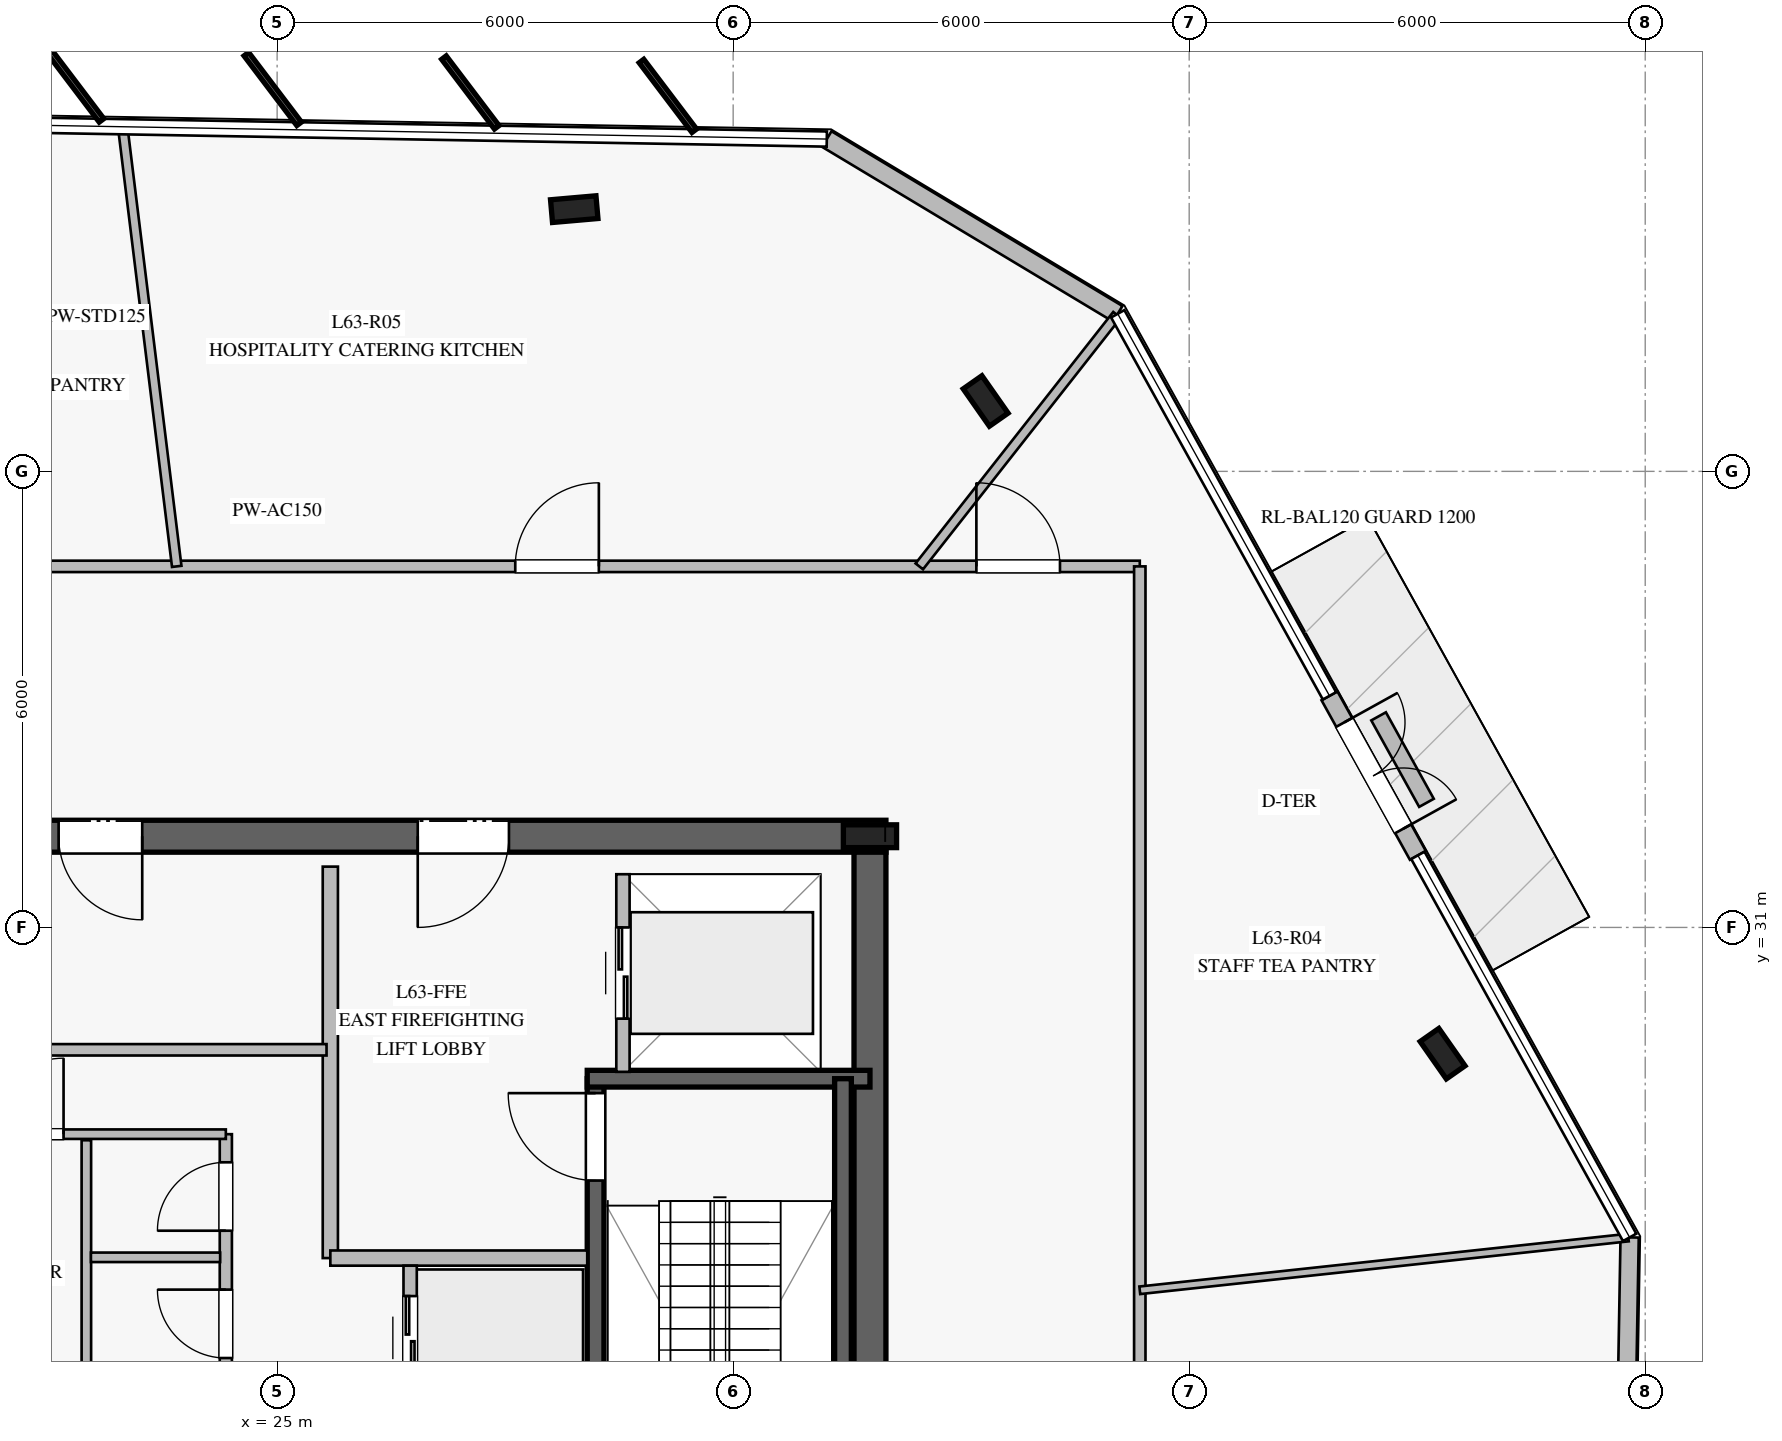
"""IFC4 building model, lengths in metres.
Left out: names, types, materials, properties, quantities, classifications, styles, units other than length and angle.
Written with IfcOpenShell. Run it as: python <this file> out.ifc"""

import sys

from ifc_helpers import new_model, si_unit, direction, frame, frame_2d, origin, origin_2d, place, context, subcontext, project, spatial, rectangle, i_section, extrude, element, fill, save


model = new_model("IFC4")
c1 = context("Model", 3, precision=1e-05, world=origin(), true_north=direction((0.0, 1.0)))
c2 = subcontext(c1, "Body", "Model", "MODEL_VIEW")
j1 = project(units=[si_unit("LENGTHUNIT", "METRE"), si_unit("PLANEANGLEUNIT", "RADIAN")], contexts=[c1])
p1 = place(None, origin())
s1 = spatial("IfcSite", under=j1, at=p1, CompositionType="ELEMENT")
p2 = place(p1, origin())
s2 = spatial("IfcBuilding", under=s1, at=p2, CompositionType="ELEMENT")
p3 = place(p2, frame((0.0, 0.0, 262.2)))
s3 = spatial("IfcBuildingStorey", under=s2, at=p3, CompositionType="ELEMENT", Elevation=262.2)
p4 = place(p3, frame((33.01, 32.2, 0.0), z_axis=(0.0, 0.0, 1.0), x_axis=(-1.0, 0.0, 0.0)))
e1 = element("IfcWall", 1, at=p4, inside=s3, PredefinedType="SHEAR", context=c2, shape_type="SweptSolid", body=[
    extrude(rectangle(XDim=16.02, YDim=0.42, at=frame_2d((8.01, 0.0))), origin(), (0.0, 0.0, 1.0), 3.78),
])
p5 = place(p4, frame((4.96, 0.0, 0.0)))
e2 = element("IfcOpeningElement", 2, at=p5, cuts=e1, PredefinedType="OPENING", context=c2, shape_type="SweptSolid", body=[
    extrude(rectangle(XDim=1.2, YDim=2.25, at=frame_2d((0.6, 1.125))), frame((0.0, 0.22, 0.0), z_axis=(0.0, -1.0, 0.0), x_axis=(1.0, 0.0, 0.0)), (0.0, 0.0, 1.0), 0.44),
])
p6 = place(p4, frame((9.785, 0.0, 0.0)))
e3 = element("IfcOpeningElement", 3, at=p6, cuts=e1, PredefinedType="OPENING", context=c2, shape_type="SweptSolid", body=[
    extrude(rectangle(XDim=1.1, YDim=2.2, at=frame_2d((0.55, 1.1))), frame((0.0, 0.22, 0.0), z_axis=(0.0, -1.0, 0.0), x_axis=(1.0, 0.0, 0.0)), (0.0, 0.0, 1.0), 0.44),
])
p7 = place(p3, frame((32.8, 18.01, 0.0), z_axis=(0.0, 0.0, 1.0), x_axis=(0.0, 1.0, 0.0)))
e4 = element("IfcWall", 4, at=p7, inside=s3, PredefinedType="SHEAR", context=c2, shape_type="SweptSolid", body=[
    extrude(rectangle(XDim=13.98, YDim=0.42, at=frame_2d((6.99, 0.0))), origin(), (0.0, 0.0, 1.0), 3.78),
])
p8 = place(p3, frame((32.8, 32.2, 0.0), z_axis=(0.0, 0.0, 1.0), x_axis=(1.0, 0.0, 0.0)))
e5 = element("IfcColumn", 5, at=p8, inside=s3, PredefinedType="COLUMN", context=c2, shape_type="SweptSolid", body=[
    extrude(i_section(OverallWidth=0.3, OverallDepth=0.7, WebThickness=0.017, FlangeThickness=0.032, at=origin_2d()), origin(), (0.0, 0.0, 1.0), 4.0),
])
p9 = place(p3, frame((29.19, 21.79, 0.0), z_axis=(0.0, 0.0, 1.0), x_axis=(0.0, 1.0, 0.0)))
e6 = element("IfcWall", 6, at=p9, inside=s3, PredefinedType="SOLIDWALL", context=c2, shape_type="SweptSolid", body=[
    extrude(rectangle(XDim=7.22, YDim=0.22, at=frame_2d((3.61, 0.0))), origin(), (0.0, 0.0, 1.0), 3.78),
])
p10 = place(p9, frame((5.88, 0.0, 0.0)))
e7 = element("IfcOpeningElement", 7, at=p10, cuts=e6, PredefinedType="OPENING", context=c2, shape_type="SweptSolid", body=[
    extrude(rectangle(XDim=1.15, YDim=2.2, at=frame_2d((0.575, 1.1))), frame((0.0, 0.12, 0.0), z_axis=(0.0, -1.0, 0.0), x_axis=(1.0, 0.0, 0.0)), (0.0, 0.0, 1.0), 0.24),
])
p11 = place(p3, frame((29.08, 29.01, 0.0), z_axis=(0.0, 0.0, 1.0), x_axis=(1.0, 0.0, 0.0)))
e8 = element("IfcWall", 8, at=p11, inside=s3, PredefinedType="SOLIDWALL", context=c2, shape_type="SweptSolid", body=[
    extrude(rectangle(XDim=3.72, YDim=0.22, at=frame_2d((1.86, 0.0))), origin(), (0.0, 0.0, 1.0), 3.78),
])
p12 = place(p3, frame((32.445, 29.01, 0.0), z_axis=(0.0, 0.0, 1.0), x_axis=(0.0, -1.0, 0.0)))
e9 = element("IfcWall", 9, at=p12, inside=s3, PredefinedType="SOLIDWALL", context=c2, shape_type="SweptSolid", body=[
    extrude(rectangle(XDim=7.22, YDim=0.22, at=frame_2d((3.61, 0.0))), origin(), (0.0, 0.0, 1.0), 3.78),
])
for number, where, z_axis, x_axis in (
    (10, (28.909, 40.45, 0.0), (0.0, 0.0, 1.0), (0.996, 0.087, 0.0)),
    (11, (40.334, 29.339, 0.0), (0.0, 0.0, 1.0), (-0.574, 0.819, 0.0)),
    (12, (34.322, 37.926, 0.0), (0.0, 0.0, 1.0), (-0.574, 0.819, 0.0)),
):
    element("IfcColumn", number, at=place(p3, frame(where, z_axis=z_axis, x_axis=x_axis)), inside=s3, PredefinedType="COLUMN", context=c2, shape_type="SweptSolid", body=[
        extrude(i_section(OverallWidth=0.3, OverallDepth=0.6, WebThickness=0.015, FlangeThickness=0.03, at=origin_2d()), origin(), (0.0, 0.0, 1.0), 4.0),
    ])
p13 = place(p3, frame((42.717, 22.458, 0.0), z_axis=(0.0, 0.0, 1.0), x_axis=(0.017443339635, 0.999847853377, 0.0)))
e13 = element("IfcWall", 13, at=p13, inside=s3, PredefinedType="STANDARD", context=c2, shape_type="SweptSolid", body=[
    extrude(rectangle(XDim=4.465, YDim=0.24, at=frame_2d((2.232, 0.0))), origin(), (0.0, 0.0, 1.0), 3.78),
])
p14 = place(p3, frame((40.009, 31.948, 0.0), z_axis=(0.0, 0.0, 1.0), x_axis=(-0.484657920522, 0.874703778473, 0.0)))
e14 = element("IfcWall", 14, at=p14, inside=s3, PredefinedType="STANDARD", context=c2, shape_type="SweptSolid", body=[
    extrude(rectangle(XDim=2.4, YDim=0.24, at=frame_2d((1.2, 0.0))), origin(), (0.0, 0.0, 1.0), 3.78),
])
p15 = place(p14, frame((0.4, 0.0, 0.0)))
e15 = element("IfcOpeningElement", 15, at=p15, cuts=e14, PredefinedType="OPENING", context=c2, shape_type="SweptSolid", body=[
    extrude(rectangle(XDim=1.6, YDim=2.25, at=frame_2d((0.8, 1.125))), frame((0.0, 0.13, 0.0), z_axis=(0.0, -1.0, 0.0), x_axis=(1.0, 0.0, 0.0)), (0.0, 0.0, 1.0), 0.26),
])
p16 = place(p3, frame((36.06, 39.073, 0.0), z_axis=(0.0, 0.0, 1.0), x_axis=(-0.857275764621, 0.514857517566, 0.0)))
e16 = element("IfcWall", 16, at=p16, inside=s3, PredefinedType="STANDARD", context=c2, shape_type="SweptSolid", body=[
    extrude(rectangle(XDim=4.465, YDim=0.24, at=frame_2d((2.233, 0.0))), origin(), (0.0, 0.0, 1.0), 3.78),
])
p17 = place(p3, frame((40.122, 32.639, 0.0), z_axis=(0.0, 0.0, 1.0), x_axis=(-0.484351793237, 0.874873328195, 0.0)))
e17 = element("IfcWall", 17, at=p17, inside=s3, PredefinedType="USERDEFINED", context=c2, shape_type="SweptSolid", body=[
    extrude(rectangle(XDim=1.301, YDim=0.22, at=frame_2d((0.65, 0.0))), origin(), (0.0, 0.0, 1.0), 0.4),
])
p18 = place(p3, frame((25.7, 26.65, 0.0), z_axis=(0.0, 0.0, 1.0), x_axis=(0.0, 1.0, 0.0)))
e18 = element("IfcWall", 18, at=p18, inside=s3, PredefinedType="PARTITIONING", context=c2, shape_type="SweptSolid", body=[
    extrude(rectangle(XDim=5.15, YDim=0.2, at=frame_2d((2.575, 0.0))), origin(), (0.0, 0.0, 1.0), 3.78),
])
p19 = place(p3, frame((25.7, 26.65, 0.0), z_axis=(0.0, 0.0, 1.0), x_axis=(1.0, 0.0, 0.0)))
e19 = element("IfcWall", 19, at=p19, inside=s3, PredefinedType="PARTITIONING", context=c2, shape_type="SweptSolid", body=[
    extrude(rectangle(XDim=3.38, YDim=0.2, at=frame_2d((1.69, 0.0))), origin(), (0.0, 0.0, 1.0), 3.78),
])
p20 = place(p3, frame((24.325, 23.35, 0.0), z_axis=(0.0, 0.0, 1.0), x_axis=(0.0, 1.0, 0.0)))
e20 = element("IfcWall", 20, at=p20, inside=s3, PredefinedType="PLUMBINGWALL", context=c2, shape_type="SweptSolid", body=[
    extrude(rectangle(XDim=4.93, YDim=0.16, at=frame_2d((2.465, 0.0))), origin(), (0.0, 0.0, 1.0), 3.78),
])
p21 = place(p20, frame((0.325, 0.0, 0.0)))
e21 = element("IfcOpeningElement", 21, at=p21, cuts=e20, PredefinedType="OPENING", context=c2, shape_type="SweptSolid", body=[
    extrude(rectangle(XDim=0.95, YDim=2.1, at=frame_2d((0.475, 1.05))), frame((0.0, 0.09, 0.0), z_axis=(0.0, -1.0, 0.0), x_axis=(1.0, 0.0, 0.0)), (0.0, 0.0, 1.0), 0.18),
])
p22 = place(p20, frame((1.985, 0.0, 0.0)))
e22 = element("IfcOpeningElement", 22, at=p22, cuts=e20, PredefinedType="OPENING", context=c2, shape_type="SweptSolid", body=[
    extrude(rectangle(XDim=0.9, YDim=2.1, at=frame_2d((0.45, 1.05))), frame((0.0, 0.09, 0.0), z_axis=(0.0, -1.0, 0.0), x_axis=(1.0, 0.0, 0.0)), (0.0, 0.0, 1.0), 0.18),
])
p23 = place(p20, frame((3.66, 0.0, 0.0)))
e23 = element("IfcOpeningElement", 23, at=p23, cuts=e20, PredefinedType="OPENING", context=c2, shape_type="SweptSolid", body=[
    extrude(rectangle(XDim=0.9, YDim=2.1, at=frame_2d((0.45, 1.05))), frame((0.0, 0.09, 0.0), z_axis=(0.0, -1.0, 0.0), x_axis=(1.0, 0.0, 0.0)), (0.0, 0.0, 1.0), 0.18),
])
p24 = place(p3, frame((20.92, 28.28, 0.0), z_axis=(0.0, 0.0, 1.0), x_axis=(1.0, 0.0, 0.0)))
e24 = element("IfcWall", 24, at=p24, inside=s3, PredefinedType="PARTITIONING", context=c2, shape_type="SweptSolid", body=[
    extrude(rectangle(XDim=3.405, YDim=0.125, at=frame_2d((1.703, 0.0))), origin(), (0.0, 0.0, 1.0), 3.78),
])
p25 = place(p24, frame((0.27, 0.0, 0.0)))
e25 = element("IfcOpeningElement", 25, at=p25, cuts=e24, PredefinedType="OPENING", context=c2, shape_type="SweptSolid", body=[
    extrude(rectangle(XDim=1.0, YDim=2.15, at=frame_2d((0.5, 1.075))), frame((0.0, 0.073, 0.0), z_axis=(0.0, -1.0, 0.0), x_axis=(1.0, 0.0, 0.0)), (0.0, 0.0, 1.0), 0.145),
])
p26 = place(p3, frame((22.49, 24.97, 0.0), z_axis=(0.0, 0.0, 1.0), x_axis=(0.0, 1.0, 0.0)))
e26 = element("IfcWall", 26, at=p26, inside=s3, PredefinedType="PARTITIONING", context=c2, shape_type="SweptSolid", body=[
    extrude(rectangle(XDim=3.23, YDim=0.125, at=frame_2d((1.615, 0.0))), origin(), (0.0, 0.0, 1.0), 3.78),
])
p27 = place(p3, frame((22.55, 26.66, 0.0), z_axis=(0.0, 0.0, 1.0), x_axis=(1.0, 0.0, 0.0)))
e27 = element("IfcWall", 27, at=p27, inside=s3, PredefinedType="PARTITIONING", context=c2, shape_type="SweptSolid", body=[
    extrude(rectangle(XDim=1.7, YDim=0.125, at=frame_2d((0.85, 0.0))), origin(), (0.0, 0.0, 1.0), 3.78),
])
p28 = place(p3, frame((19.75, 29.39, 0.0), z_axis=(0.0, 0.0, 1.0), x_axis=(1.0, 0.0, 0.0)))
e28 = element("IfcWall", 28, at=p28, inside=s3, PredefinedType="PARTITIONING", context=c2, shape_type="SweptSolid", body=[
    extrude(rectangle(XDim=5.9, YDim=0.15, at=frame_2d((2.95, 0.0))), origin(), (0.0, 0.0, 1.0), 3.78),
])
p29 = place(p3, frame((26.75, 24.65, 0.0), z_axis=(0.0, 0.0, 1.0), x_axis=(0.0, 1.0, 0.0)))
e29 = element("IfcWall", 29, at=p29, inside=s3, PredefinedType="PARTITIONING", context=c2, shape_type="SweptSolid", body=[
    extrude(rectangle(XDim=1.9, YDim=0.175, at=frame_2d((0.95, 0.0))), origin(), (0.0, 0.0, 1.0), 3.78),
])
p30 = place(p29, frame((0.4, 0.0, 0.0)))
e30 = element("IfcOpeningElement", 30, at=p30, cuts=e29, PredefinedType="OPENING", context=c2, shape_type="SweptSolid", body=[
    extrude(rectangle(XDim=1.1, YDim=2.2, at=frame_2d((0.55, 1.1))), frame((0.0, 0.098, 0.0), z_axis=(0.0, -1.0, 0.0), x_axis=(1.0, 0.0, 0.0)), (0.0, 0.0, 1.0), 0.195),
])
p31 = place(p3, frame((29.55, 29.1, 0.0), z_axis=(0.0, 0.0, 1.0), x_axis=(0.0, 1.0, 0.0)))
e31 = element("IfcWall", 31, at=p31, inside=s3, PredefinedType="PARTITIONING", context=c2, shape_type="SweptSolid", body=[
    extrude(rectangle(XDim=2.6, YDim=0.175, at=frame_2d((1.3, 0.0))), origin(), (0.0, 0.0, 1.0), 3.78),
])
p32 = place(p31, frame((0.7, 0.0, 0.0)))
e32 = element("IfcOpeningElement", 32, at=p32, cuts=e31, PredefinedType="OPENING", context=c2, shape_type="SweptSolid", body=[
    extrude(rectangle(XDim=1.2, YDim=2.2, at=frame_2d((0.6, 1.1))), frame((0.0, 0.098, 0.0), z_axis=(0.0, -1.0, 0.0), x_axis=(1.0, 0.0, 0.0)), (0.0, 0.0, 1.0), 0.195),
])
p33 = place(p3, frame((13.65, 35.75, 0.0), z_axis=(0.0, 0.0, 1.0), x_axis=(1.0, 0.0, 0.0)))
e33 = element("IfcWall", 33, at=p33, inside=s3, PredefinedType="PARTITIONING", context=c2, shape_type="SweptSolid", body=[
    extrude(rectangle(XDim=22.7, YDim=0.15, at=frame_2d((11.35, 0.0))), origin(), (0.0, 0.0, 1.0), 3.28),
])
p34 = place(p33, frame((20.55, 0.0, 0.0)))
e34 = element("IfcOpeningElement", 34, at=p34, cuts=e33, PredefinedType="OPENING", context=c2, shape_type="SweptSolid", body=[
    extrude(rectangle(XDim=1.1, YDim=2.2, at=frame_2d((0.55, 1.1))), frame((0.0, 0.085, 0.0), z_axis=(0.0, -1.0, 0.0), x_axis=(1.0, 0.0, 0.0)), (0.0, 0.0, 1.0), 0.17),
])
p35 = place(p33, frame((14.483, 0.0, 0.0)))
e35 = element("IfcOpeningElement", 35, at=p35, cuts=e33, PredefinedType="OPENING", context=c2, shape_type="SweptSolid", body=[
    extrude(rectangle(XDim=1.1, YDim=2.2, at=frame_2d((0.55, 1.1))), frame((0.0, 0.085, 0.0), z_axis=(0.0, -1.0, 0.0), x_axis=(1.0, 0.0, 0.0)), (0.0, 0.0, 1.0), 0.17),
])
p36 = place(p33, frame((4.644, 0.0, 0.0)))
e36 = element("IfcOpeningElement", 36, at=p36, cuts=e33, PredefinedType="OPENING", context=c2, shape_type="SweptSolid", body=[
    extrude(rectangle(XDim=1.1, YDim=2.2, at=frame_2d((0.55, 1.1))), frame((0.0, 0.085, 0.0), z_axis=(0.0, -1.0, 0.0), x_axis=(1.0, 0.0, 0.0)), (0.0, 0.0, 1.0), 0.17),
])
p37 = place(p3, frame((36.35, 35.75, 0.0), z_axis=(0.0, 0.0, 1.0), x_axis=(0.0, -1.0, 0.0)))
e37 = element("IfcWall", 37, at=p37, inside=s3, PredefinedType="PARTITIONING", context=c2, shape_type="SweptSolid", body=[
    extrude(rectangle(XDim=21.5, YDim=0.15, at=frame_2d((10.75, 0.0))), origin(), (0.0, 0.0, 1.0), 3.02),
])
p38 = place(p37, frame((14.686, 0.0, 0.0)))
e38 = element("IfcOpeningElement", 38, at=p38, cuts=e37, PredefinedType="OPENING", context=c2, shape_type="SweptSolid", body=[
    extrude(rectangle(XDim=1.1, YDim=2.2, at=frame_2d((0.55, 1.1))), frame((0.0, 0.085, 0.0), z_axis=(0.0, -1.0, 0.0), x_axis=(1.0, 0.0, 0.0)), (0.0, 0.0, 1.0), 0.17),
])
p39 = place(p3, frame((23.679, 35.75, 0.0), z_axis=(0.0, 0.0, 1.0), x_axis=(-0.12199730689, 0.992530431328, 0.0)))
e39 = element("IfcWall", 39, at=p39, inside=s3, PredefinedType="PARTITIONING", context=c2, shape_type="SweptSolid", body=[
    extrude(rectangle(XDim=5.812, YDim=0.125, at=frame_2d((2.906, 0.0))), origin(), (0.0, 0.0, 1.0), 3.28),
])
p40 = place(p3, frame((36.35, 26.226, 0.0), z_axis=(0.0, 0.0, 1.0), x_axis=(0.994224701647, 0.107318417034, 0.0)))
e40 = element("IfcWall", 40, at=p40, inside=s3, PredefinedType="MOVABLE", context=c2, shape_type="SweptSolid", body=[
    extrude(rectangle(XDim=6.465, YDim=0.1, at=frame_2d((3.233, 0.0))), origin(), (0.0, 0.0, 1.0), 3.28),
])
p41 = place(p3, frame((33.449, 35.75, 0.0), z_axis=(0.0, 0.0, 1.0), x_axis=(0.617980365639, 0.786193530681, 0.0)))
e41 = element("IfcWall", 41, at=p41, inside=s3, PredefinedType="PARTITIONING", context=c2, shape_type="SweptSolid", body=[
    extrude(rectangle(XDim=4.209, YDim=0.125, at=frame_2d((2.104, 0.0))), origin(), (0.0, 0.0, 1.0), 3.28),
])
p42 = place(p15, frame((1.6, 0.0, 0.0), z_axis=(0.0, 0.0, 1.0), x_axis=(-1.0, 0.0, 0.0)))
e42 = element("IfcDoor", 42, at=p42, inside=s3, OperationType="DOUBLE_DOOR_SINGLE_SWING", PredefinedType="DOOR", context=c2, shape_type="SweptSolid", body=[
    extrude(rectangle(XDim=1.6, YDim=2.25, at=frame_2d((0.8, 1.125))), frame((0.0, 0.025, 0.0), z_axis=(0.0, -1.0, 0.0), x_axis=(1.0, 0.0, 0.0)), (0.0, 0.0, 1.0), 0.05),
])
fill(e15, e42)
p43 = place(p10, origin())
e43 = element("IfcDoor", 43, at=p43, inside=s3, OperationType="SINGLE_SWING_RIGHT", PredefinedType="DOOR", context=c2, shape_type="SweptSolid", body=[
    extrude(rectangle(XDim=1.15, YDim=2.2, at=frame_2d((0.575, 1.1))), frame((0.0, 0.025, 0.0), z_axis=(0.0, -1.0, 0.0), x_axis=(1.0, 0.0, 0.0)), (0.0, 0.0, 1.0), 0.05),
])
fill(e7, e43)
p44 = place(p5, origin())
e44 = element("IfcDoor", 44, at=p44, inside=s3, OperationType="SINGLE_SWING_RIGHT", PredefinedType="DOOR", context=c2, shape_type="SweptSolid", body=[
    extrude(rectangle(XDim=1.2, YDim=2.25, at=frame_2d((0.6, 1.125))), frame((0.0, 0.025, 0.0), z_axis=(0.0, -1.0, 0.0), x_axis=(1.0, 0.0, 0.0)), (0.0, 0.0, 1.0), 0.05),
])
fill(e2, e44)
p45 = place(p22, origin())
e45 = element("IfcDoor", 45, at=p45, inside=s3, OperationType="SINGLE_SWING_RIGHT", PredefinedType="DOOR", context=c2, shape_type="SweptSolid", body=[
    extrude(rectangle(XDim=0.9, YDim=2.1, at=frame_2d((0.45, 1.05))), frame((0.0, 0.025, 0.0), z_axis=(0.0, -1.0, 0.0), x_axis=(1.0, 0.0, 0.0)), (0.0, 0.0, 1.0), 0.05),
])
fill(e22, e45)
p46 = place(p23, origin())
e46 = element("IfcDoor", 46, at=p46, inside=s3, OperationType="SINGLE_SWING_LEFT", PredefinedType="DOOR", context=c2, shape_type="SweptSolid", body=[
    extrude(rectangle(XDim=0.9, YDim=2.1, at=frame_2d((0.45, 1.05))), frame((0.0, 0.025, 0.0), z_axis=(0.0, -1.0, 0.0), x_axis=(1.0, 0.0, 0.0)), (0.0, 0.0, 1.0), 0.05),
])
fill(e23, e46)
p47 = place(p25, origin())
e47 = element("IfcDoor", 47, at=p47, inside=s3, OperationType="SINGLE_SWING_RIGHT", PredefinedType="DOOR", context=c2, shape_type="SweptSolid", body=[
    extrude(rectangle(XDim=1.0, YDim=2.15, at=frame_2d((0.5, 1.075))), frame((0.0, 0.025, 0.0), z_axis=(0.0, -1.0, 0.0), x_axis=(1.0, 0.0, 0.0)), (0.0, 0.0, 1.0), 0.05),
])
fill(e25, e47)
p48 = place(p6, origin())
e48 = element("IfcDoor", 48, at=p48, inside=s3, OperationType="SINGLE_SWING_LEFT", PredefinedType="DOOR", context=c2, shape_type="SweptSolid", body=[
    extrude(rectangle(XDim=1.1, YDim=2.2, at=frame_2d((0.55, 1.1))), frame((0.0, 0.025, 0.0), z_axis=(0.0, -1.0, 0.0), x_axis=(1.0, 0.0, 0.0)), (0.0, 0.0, 1.0), 0.05),
])
fill(e3, e48)
p49 = place(p30, origin())
e49 = element("IfcDoor", 49, at=p49, inside=s3, OperationType="DOUBLE_DOOR_SLIDING", PredefinedType="DOOR", context=c2, shape_type="SweptSolid", body=[
    extrude(rectangle(XDim=1.1, YDim=2.2, at=frame_2d((0.55, 1.1))), frame((0.0, 0.025, 0.0), z_axis=(0.0, -1.0, 0.0), x_axis=(1.0, 0.0, 0.0)), (0.0, 0.0, 1.0), 0.05),
])
fill(e30, e49)
p50 = place(p32, origin())
e50 = element("IfcDoor", 50, at=p50, inside=s3, OperationType="DOUBLE_DOOR_SLIDING", PredefinedType="DOOR", context=c2, shape_type="SweptSolid", body=[
    extrude(rectangle(XDim=1.2, YDim=2.2, at=frame_2d((0.6, 1.1))), frame((0.0, 0.025, 0.0), z_axis=(0.0, -1.0, 0.0), x_axis=(1.0, 0.0, 0.0)), (0.0, 0.0, 1.0), 0.05),
])
fill(e32, e50)
p51 = place(p34, origin())
e51 = element("IfcDoor", 51, at=p51, inside=s3, OperationType="SINGLE_SWING_LEFT", PredefinedType="DOOR", context=c2, shape_type="SweptSolid", body=[
    extrude(rectangle(XDim=1.1, YDim=2.2, at=frame_2d((0.55, 1.1))), frame((0.0, 0.025, 0.0), z_axis=(0.0, -1.0, 0.0), x_axis=(1.0, 0.0, 0.0)), (0.0, 0.0, 1.0), 0.05),
])
fill(e34, e51)
p52 = place(p35, origin())
e52 = element("IfcDoor", 52, at=p52, inside=s3, OperationType="SINGLE_SWING_RIGHT", PredefinedType="DOOR", context=c2, shape_type="SweptSolid", body=[
    extrude(rectangle(XDim=1.1, YDim=2.2, at=frame_2d((0.55, 1.1))), frame((0.0, 0.025, 0.0), z_axis=(0.0, -1.0, 0.0), x_axis=(1.0, 0.0, 0.0)), (0.0, 0.0, 1.0), 0.05),
])
fill(e35, e52)
save(model, sys.argv[1])
